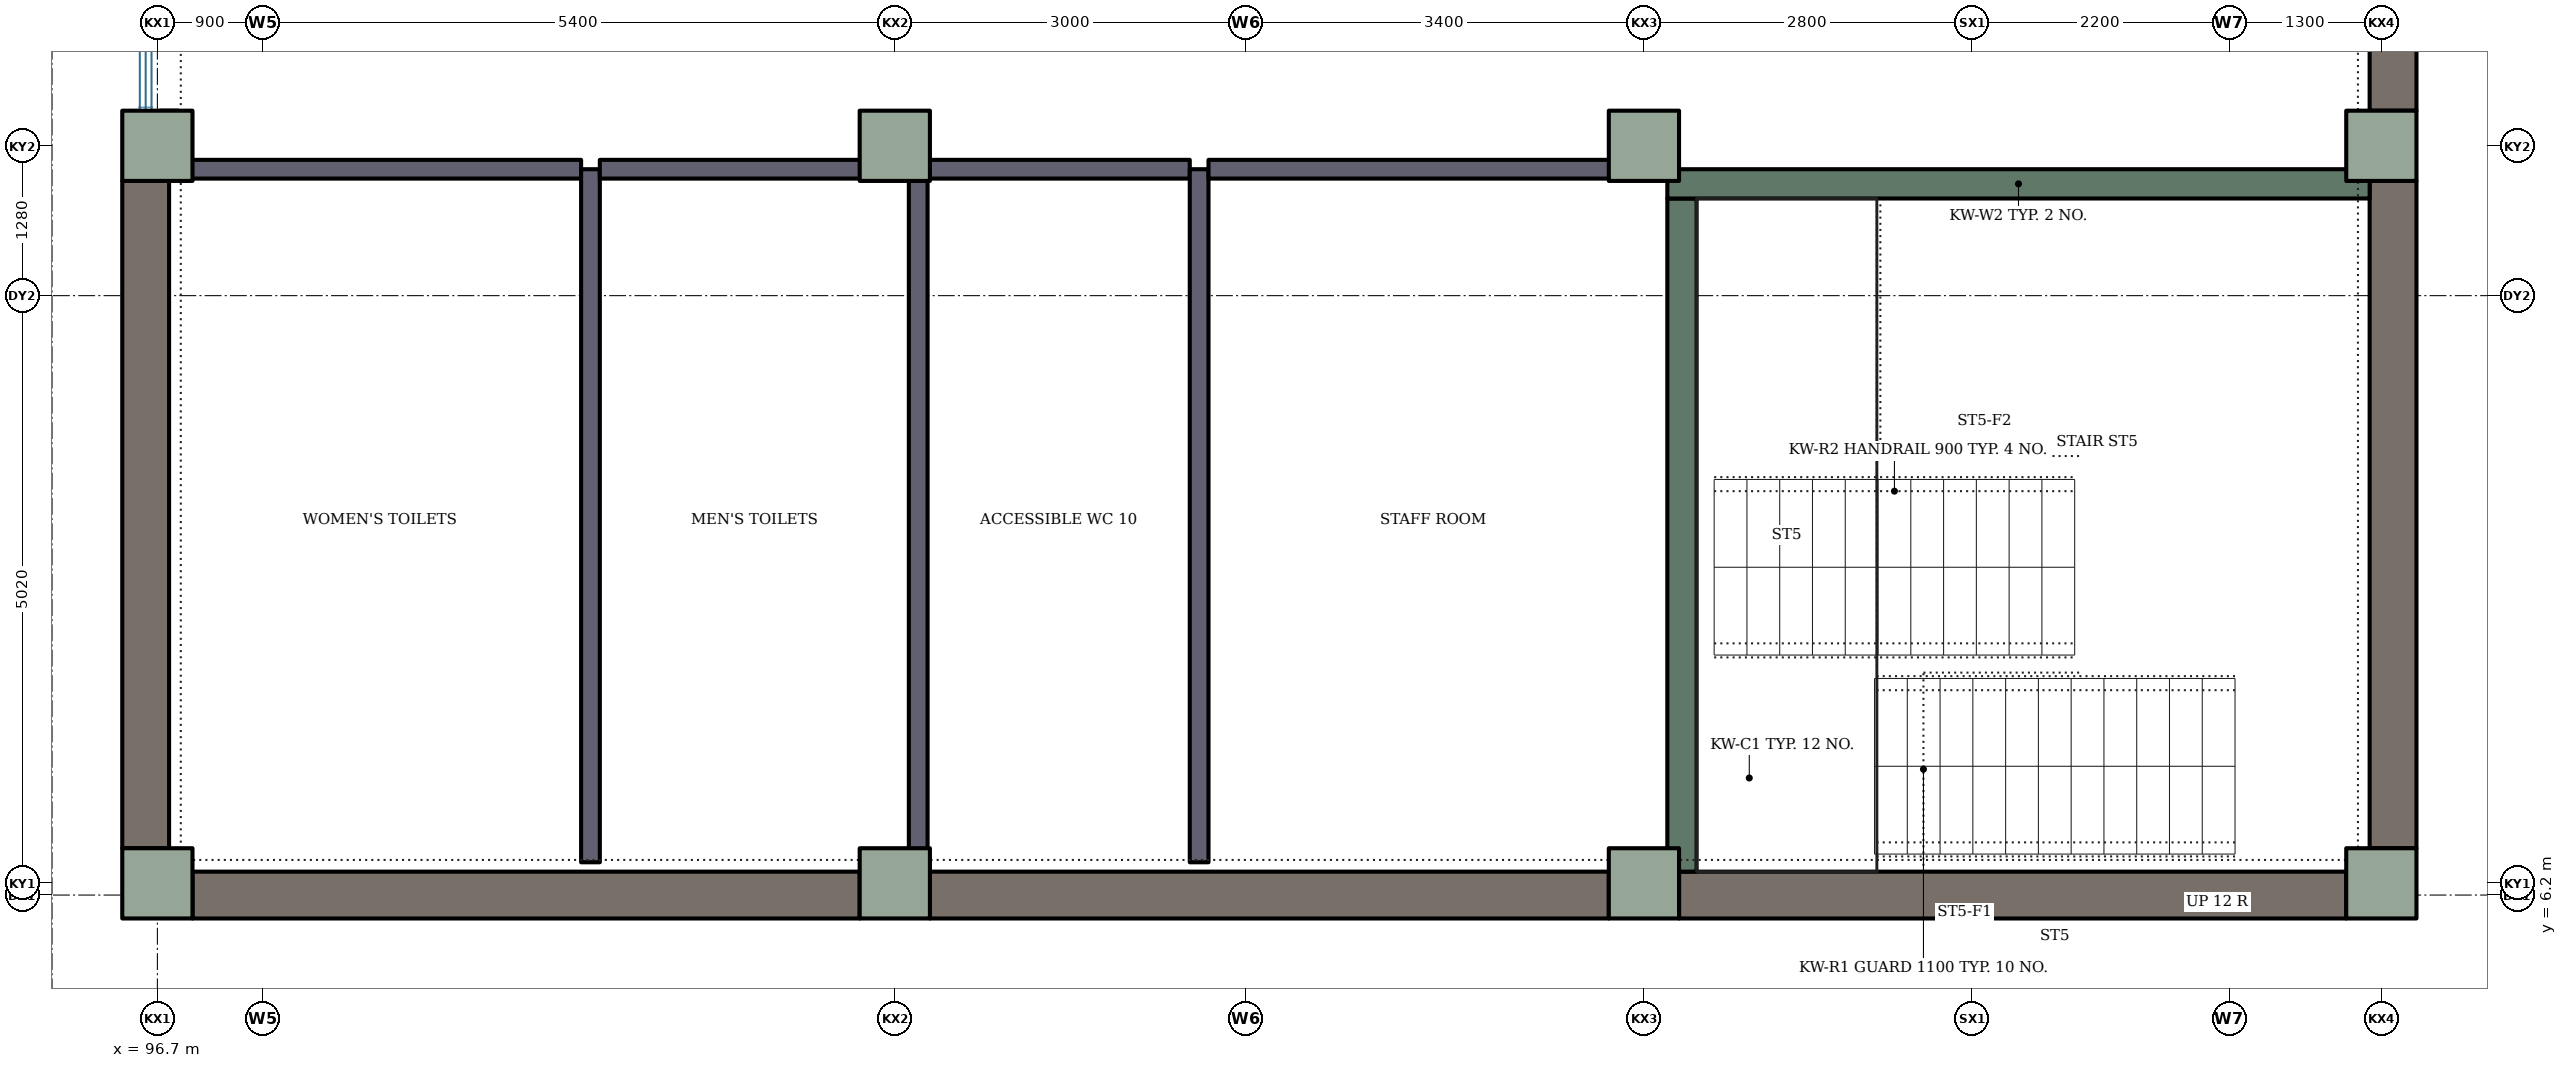
"""IFC4 building model, lengths in metres.
Left out: names, types, materials, properties, quantities, classifications, styles, units other than length and angle.
Written with IfcOpenShell. Run it as: python <this file> out.ifc"""

import sys

from ifc_helpers import new_model, si_unit, direction, frame, frame_2d, origin, origin_2d, place, context, subcontext, project, spatial, rectangle, extrude, element, fill, save


model = new_model("IFC4")
c1 = context("Model", 3, precision=1e-05, world=origin(), true_north=direction((0.0, 1.0)))
c2 = subcontext(c1, "Body", "Model", "MODEL_VIEW")
j1 = project(units=[si_unit("LENGTHUNIT", "METRE"), si_unit("PLANEANGLEUNIT", "RADIAN")], contexts=[c1])
p1 = place(None, origin())
s1 = spatial("IfcSite", under=j1, at=p1, CompositionType="ELEMENT")
p2 = place(p1, origin())
s2 = spatial("IfcBuilding", under=s1, at=p2, CompositionType="ELEMENT")
p3 = place(p2, frame((0.0, 0.0, 8.4)))
s3 = spatial("IfcBuildingStorey", under=s2, at=p3, CompositionType="ELEMENT", Elevation=8.4)
for number, where, z_axis, x_axis in (
    (1, (96.7, 6.3, 0.0), (0.0, 0.0, 1.0), (1.0, 0.0, 0.0)),
    (2, (96.7, 12.6, 0.0), (0.0, 0.0, 1.0), (1.0, 0.0, 0.0)),
    (3, (103.0, 6.3, 0.0), (0.0, 0.0, 1.0), (1.0, 0.0, 0.0)),
    (4, (103.0, 12.6, 0.0), (0.0, 0.0, 1.0), (1.0, 0.0, 0.0)),
    (5, (109.4, 6.3, 0.0), (0.0, 0.0, 1.0), (1.0, 0.0, 0.0)),
    (6, (109.4, 12.6, 0.0), (0.0, 0.0, 1.0), (1.0, 0.0, 0.0)),
    (7, (115.7, 6.3, 0.0), (0.0, 0.0, 1.0), (1.0, 0.0, 0.0)),
    (8, (115.7, 12.6, 0.0), (0.0, 0.0, 1.0), (1.0, 0.0, 0.0)),
):
    element("IfcColumn", number, at=place(p3, frame(where, z_axis=z_axis, x_axis=x_axis)), inside=s3, PredefinedType="COLUMN", context=c2, shape_type="SweptSolid", body=[
        extrude(rectangle(XDim=0.6, YDim=0.6, at=origin_2d()), origin(), (0.0, 0.0, 1.0), 4.2),
    ])
p4 = place(p3, frame((97.0, 6.2, 0.0), z_axis=(0.0, 0.0, 1.0), x_axis=(1.0, 0.0, 0.0)))
e9 = element("IfcWall", 9, at=p4, inside=s3, PredefinedType="SOLIDWALL", context=c2, shape_type="SweptSolid", body=[
    extrude(rectangle(XDim=5.7, YDim=0.4, at=frame_2d((2.85, 0.0))), origin(), (0.0, 0.0, 1.0), 4.2),
])
p5 = place(p4, frame((1.65, 0.0, 0.9)))
e10 = element("IfcOpeningElement", 10, at=p5, cuts=e9, PredefinedType="OPENING", context=c2, shape_type="SweptSolid", body=[
    extrude(rectangle(XDim=2.4, YDim=2.7, at=frame_2d((1.2, 1.35))), frame((0.0, 0.21, 0.0), z_axis=(0.0, -1.0, 0.0), x_axis=(1.0, 0.0, 0.0)), (0.0, 0.0, 1.0), 0.42),
])
p6 = place(p3, frame((103.3, 6.2, 0.0), z_axis=(0.0, 0.0, 1.0), x_axis=(1.0, 0.0, 0.0)))
e11 = element("IfcWall", 11, at=p6, inside=s3, PredefinedType="SOLIDWALL", context=c2, shape_type="SweptSolid", body=[
    extrude(rectangle(XDim=5.8, YDim=0.4, at=frame_2d((2.9, 0.0))), origin(), (0.0, 0.0, 1.0), 4.2),
])
p7 = place(p6, frame((1.7, 0.0, 0.9)))
e12 = element("IfcOpeningElement", 12, at=p7, cuts=e11, PredefinedType="OPENING", context=c2, shape_type="SweptSolid", body=[
    extrude(rectangle(XDim=2.4, YDim=2.7, at=frame_2d((1.2, 1.35))), frame((0.0, 0.21, 0.0), z_axis=(0.0, -1.0, 0.0), x_axis=(1.0, 0.0, 0.0)), (0.0, 0.0, 1.0), 0.42),
])
for number, where, z_axis, x_axis in (
    (13, (109.7, 6.2, 0.0), (0.0, 0.0, 1.0), (1.0, 0.0, 0.0)),
    (14, (96.6, 6.6, 0.0), (0.0, 0.0, 1.0), (0.0, 1.0, 0.0)),
):
    element("IfcWall", number, at=place(p3, frame(where, z_axis=z_axis, x_axis=x_axis)), inside=s3, PredefinedType="SOLIDWALL", context=c2, shape_type="SweptSolid", body=[
        extrude(rectangle(XDim=5.7, YDim=0.4, at=frame_2d((2.85, 0.0))), origin(), (0.0, 0.0, 1.0), 4.2),
    ])
p8 = place(p3, frame((115.8, 12.3, 0.0), z_axis=(0.0, 0.0, 1.0), x_axis=(0.0, -1.0, 0.0)))
e15 = element("IfcWall", 15, at=p8, inside=s3, PredefinedType="SOLIDWALL", context=c2, shape_type="SweptSolid", body=[
    extrude(rectangle(XDim=5.7, YDim=0.4, at=frame_2d((2.85, 0.0))), origin(), (0.0, 0.0, 1.0), 4.2),
])
p9 = place(p8, frame((2.35, 0.0, 0.9)))
e16 = element("IfcOpeningElement", 16, at=p9, cuts=e15, PredefinedType="OPENING", context=c2, shape_type="SweptSolid", body=[
    extrude(rectangle(XDim=1.0, YDim=1.5, at=frame_2d((0.5, 0.75))), frame((0.0, 0.21, 0.0), z_axis=(0.0, -1.0, 0.0), x_axis=(1.0, 0.0, 0.0)), (0.0, 0.0, 1.0), 0.42),
])
p10 = place(p3, frame((115.8, 18.7, 0.0), z_axis=(0.0, 0.0, 1.0), x_axis=(0.0, -1.0, 0.0)))
e17 = element("IfcWall", 17, at=p10, inside=s3, PredefinedType="SOLIDWALL", context=c2, shape_type="SweptSolid", body=[
    extrude(rectangle(XDim=5.8, YDim=0.4, at=frame_2d((2.9, 0.0))), origin(), (0.0, 0.0, 1.0), 4.2),
])
p11 = place(p10, frame((1.7, 0.0, 0.9)))
e18 = element("IfcOpeningElement", 18, at=p11, cuts=e17, PredefinedType="OPENING", context=c2, shape_type="SweptSolid", body=[
    extrude(rectangle(XDim=2.4, YDim=2.7, at=frame_2d((1.2, 1.35))), frame((0.0, 0.21, 0.0), z_axis=(0.0, -1.0, 0.0), x_axis=(1.0, 0.0, 0.0)), (0.0, 0.0, 1.0), 0.42),
])
p12 = place(p3, frame((109.725, 6.4, 0.0), z_axis=(0.0, 0.0, 1.0), x_axis=(0.0, 1.0, 0.0)))
e19 = element("IfcWall", 19, at=p12, inside=s3, PredefinedType="SHEAR", context=c2, shape_type="SweptSolid", body=[
    extrude(rectangle(XDim=5.75, YDim=0.25, at=frame_2d((2.875, 0.0))), origin(), (0.0, 0.0, 1.0), 4.2),
])
p13 = place(p3, frame((109.6, 12.275, 0.0), z_axis=(0.0, 0.0, 1.0), x_axis=(1.0, 0.0, 0.0)))
e20 = element("IfcWall", 20, at=p13, inside=s3, PredefinedType="SHEAR", context=c2, shape_type="SweptSolid", body=[
    extrude(rectangle(XDim=6.0, YDim=0.25, at=frame_2d((3.0, 0.0))), origin(), (0.0, 0.0, 1.0), 4.2),
])
p14 = place(p13, frame((4.164, 0.0, 0.0)))
e21 = element("IfcOpeningElement", 21, at=p14, cuts=e20, PredefinedType="OPENING", context=c2, shape_type="SweptSolid", body=[
    extrude(rectangle(XDim=1.0, YDim=2.1, at=frame_2d((0.5, 1.05))), frame((0.0, 0.135, 0.0), z_axis=(0.0, -1.0, 0.0), x_axis=(1.0, 0.0, 0.0)), (0.0, 0.0, 1.0), 0.27),
])
p15 = place(p3, frame((96.8, 12.9, 0.0), z_axis=(0.0, 0.0, 1.0), x_axis=(0.0, -1.0, 0.0)))
e22 = element("IfcWall", 22, at=p15, inside=s3, PredefinedType="PARTITIONING", context=c2, shape_type="SweptSolid", body=[
    extrude(rectangle(XDim=0.5, YDim=0.16, at=frame_2d((0.25, 0.0))), origin(), (0.0, 0.0, 1.0), 3.9),
])
p16 = place(p3, frame((100.32, 12.4, 0.0), z_axis=(0.0, 0.0, 1.0), x_axis=(-1.0, 0.0, 0.0)))
e23 = element("IfcWall", 23, at=p16, inside=s3, PredefinedType="PARTITIONING", context=c2, shape_type="SweptSolid", body=[
    extrude(rectangle(XDim=3.44, YDim=0.16, at=frame_2d((1.72, 0.0))), origin(), (0.0, 0.0, 1.0), 3.9),
])
p17 = place(p16, frame((1.27, 0.0, 0.0)))
e24 = element("IfcOpeningElement", 24, at=p17, cuts=e23, PredefinedType="OPENING", context=c2, shape_type="SweptSolid", body=[
    extrude(rectangle(XDim=0.9, YDim=2.1, at=frame_2d((0.45, 1.05))), frame((0.0, 0.09, 0.0), z_axis=(0.0, -1.0, 0.0), x_axis=(1.0, 0.0, 0.0)), (0.0, 0.0, 1.0), 0.18),
])
p18 = place(p3, frame((100.4, 6.48, 0.0), z_axis=(0.0, 0.0, 1.0), x_axis=(0.0, 1.0, 0.0)))
e25 = element("IfcWall", 25, at=p18, inside=s3, PredefinedType="PARTITIONING", context=c2, shape_type="SweptSolid", body=[
    extrude(rectangle(XDim=5.92, YDim=0.16, at=frame_2d((2.96, 0.0))), origin(), (0.0, 0.0, 1.0), 3.9),
])
p19 = place(p3, frame((102.78, 6.4, 0.0), z_axis=(0.0, 0.0, 1.0), x_axis=(1.0, 0.0, 0.0)))
e26 = element("IfcWall", 26, at=p19, inside=s3, PredefinedType="PARTITIONING", context=c2, shape_type="SweptSolid", body=[
    extrude(rectangle(XDim=0.42, YDim=0.16, at=frame_2d((0.21, 0.0))), origin(), (0.0, 0.0, 1.0), 3.9),
])
p20 = place(p3, frame((103.12, 12.4, 0.0), z_axis=(0.0, 0.0, 1.0), x_axis=(-1.0, 0.0, 0.0)))
e27 = element("IfcWall", 27, at=p20, inside=s3, PredefinedType="PARTITIONING", context=c2, shape_type="SweptSolid", body=[
    extrude(rectangle(XDim=2.64, YDim=0.16, at=frame_2d((1.32, 0.0))), origin(), (0.0, 0.0, 1.0), 3.9),
])
p21 = place(p20, frame((0.87, 0.0, 0.0)))
e28 = element("IfcOpeningElement", 28, at=p21, cuts=e27, PredefinedType="OPENING", context=c2, shape_type="SweptSolid", body=[
    extrude(rectangle(XDim=0.9, YDim=2.1, at=frame_2d((0.45, 1.05))), frame((0.0, 0.09, 0.0), z_axis=(0.0, -1.0, 0.0), x_axis=(1.0, 0.0, 0.0)), (0.0, 0.0, 1.0), 0.18),
])
p22 = place(p3, frame((103.2, 6.48, 0.0), z_axis=(0.0, 0.0, 1.0), x_axis=(0.0, 1.0, 0.0)))
e29 = element("IfcWall", 29, at=p22, inside=s3, PredefinedType="PARTITIONING", context=c2, shape_type="SweptSolid", body=[
    extrude(rectangle(XDim=5.92, YDim=0.16, at=frame_2d((2.96, 0.0))), origin(), (0.0, 0.0, 1.0), 3.9),
])
p23 = place(p3, frame((105.52, 12.4, 0.0), z_axis=(0.0, 0.0, 1.0), x_axis=(-1.0, 0.0, 0.0)))
e30 = element("IfcWall", 30, at=p23, inside=s3, PredefinedType="PARTITIONING", context=c2, shape_type="SweptSolid", body=[
    extrude(rectangle(XDim=2.24, YDim=0.16, at=frame_2d((1.12, 0.0))), origin(), (0.0, 0.0, 1.0), 3.9),
])
p24 = place(p23, frame((0.67, 0.0, 0.0)))
e31 = element("IfcOpeningElement", 31, at=p24, cuts=e30, PredefinedType="OPENING", context=c2, shape_type="SweptSolid", body=[
    extrude(rectangle(XDim=0.9, YDim=2.1, at=frame_2d((0.45, 1.05))), frame((0.0, 0.09, 0.0), z_axis=(0.0, -1.0, 0.0), x_axis=(1.0, 0.0, 0.0)), (0.0, 0.0, 1.0), 0.18),
])
p25 = place(p3, frame((105.6, 6.48, 0.0), z_axis=(0.0, 0.0, 1.0), x_axis=(0.0, 1.0, 0.0)))
e32 = element("IfcWall", 32, at=p25, inside=s3, PredefinedType="PARTITIONING", context=c2, shape_type="SweptSolid", body=[
    extrude(rectangle(XDim=5.92, YDim=0.16, at=frame_2d((2.96, 0.0))), origin(), (0.0, 0.0, 1.0), 3.9),
])
p26 = place(p3, frame((109.18, 6.4, 0.0), z_axis=(0.0, 0.0, 1.0), x_axis=(1.0, 0.0, 0.0)))
e33 = element("IfcWall", 33, at=p26, inside=s3, PredefinedType="PARTITIONING", context=c2, shape_type="SweptSolid", body=[
    extrude(rectangle(XDim=0.34, YDim=0.16, at=frame_2d((0.17, 0.0))), origin(), (0.0, 0.0, 1.0), 3.9),
])
p27 = place(p3, frame((109.52, 12.4, 0.0), z_axis=(0.0, 0.0, 1.0), x_axis=(-1.0, 0.0, 0.0)))
e34 = element("IfcWall", 34, at=p27, inside=s3, PredefinedType="PARTITIONING", context=c2, shape_type="SweptSolid", body=[
    extrude(rectangle(XDim=3.84, YDim=0.16, at=frame_2d((1.92, 0.0))), origin(), (0.0, 0.0, 1.0), 3.9),
])
p28 = place(p27, frame((1.47, 0.0, 0.0)))
e35 = element("IfcOpeningElement", 35, at=p28, cuts=e34, PredefinedType="OPENING", context=c2, shape_type="SweptSolid", body=[
    extrude(rectangle(XDim=1.0, YDim=2.1, at=frame_2d((0.5, 1.05))), frame((0.0, 0.09, 0.0), z_axis=(0.0, -1.0, 0.0), x_axis=(1.0, 0.0, 0.0)), (0.0, 0.0, 1.0), 0.18),
])
p29 = place(p3, frame((115.6, 12.48, 0.0), z_axis=(0.0, 0.0, 1.0), x_axis=(0.0, 1.0, 0.0)))
e36 = element("IfcWall", 36, at=p29, inside=s3, PredefinedType="PARTITIONING", context=c2, shape_type="SweptSolid", body=[
    extrude(rectangle(XDim=0.34, YDim=0.16, at=frame_2d((0.17, 0.0))), origin(), (0.0, 0.0, 1.0), 3.9),
])
p30 = place(p9, origin())
e37 = element("IfcWindow", 37, at=p30, inside=s3, PartitioningType="SINGLE_PANEL", PredefinedType="WINDOW", context=c2, shape_type="SweptSolid", body=[
    extrude(rectangle(XDim=1.0, YDim=1.5, at=frame_2d((0.5, 0.75))), frame((0.0, 0.03, 0.0), z_axis=(0.0, -1.0, 0.0), x_axis=(1.0, 0.0, 0.0)), (0.0, 0.0, 1.0), 0.06),
])
fill(e16, e37)
p31 = place(p5, origin())
e38 = element("IfcWindow", 38, at=p31, inside=s3, PartitioningType="SINGLE_PANEL", PredefinedType="WINDOW", context=c2, shape_type="SweptSolid", body=[
    extrude(rectangle(XDim=2.4, YDim=2.7, at=frame_2d((1.2, 1.35))), frame((0.0, 0.03, 0.0), z_axis=(0.0, -1.0, 0.0), x_axis=(1.0, 0.0, 0.0)), (0.0, 0.0, 1.0), 0.06),
])
fill(e10, e38)
p32 = place(p7, origin())
e39 = element("IfcWindow", 39, at=p32, inside=s3, PartitioningType="SINGLE_PANEL", PredefinedType="WINDOW", context=c2, shape_type="SweptSolid", body=[
    extrude(rectangle(XDim=2.4, YDim=2.7, at=frame_2d((1.2, 1.35))), frame((0.0, 0.03, 0.0), z_axis=(0.0, -1.0, 0.0), x_axis=(1.0, 0.0, 0.0)), (0.0, 0.0, 1.0), 0.06),
])
fill(e12, e39)
p33 = place(p17, origin())
e40 = element("IfcDoor", 40, at=p33, inside=s3, OperationType="SINGLE_SWING_LEFT", PredefinedType="DOOR", context=c2, shape_type="SweptSolid", body=[
    extrude(rectangle(XDim=0.9, YDim=2.1, at=frame_2d((0.45, 1.05))), frame((0.0, 0.025, 0.0), z_axis=(0.0, -1.0, 0.0), x_axis=(1.0, 0.0, 0.0)), (0.0, 0.0, 1.0), 0.05),
])
fill(e24, e40)
p34 = place(p21, origin())
e41 = element("IfcDoor", 41, at=p34, inside=s3, OperationType="SINGLE_SWING_LEFT", PredefinedType="DOOR", context=c2, shape_type="SweptSolid", body=[
    extrude(rectangle(XDim=0.9, YDim=2.1, at=frame_2d((0.45, 1.05))), frame((0.0, 0.025, 0.0), z_axis=(0.0, -1.0, 0.0), x_axis=(1.0, 0.0, 0.0)), (0.0, 0.0, 1.0), 0.05),
])
fill(e28, e41)
p35 = place(p24, origin())
e42 = element("IfcDoor", 42, at=p35, inside=s3, OperationType="SINGLE_SWING_LEFT", PredefinedType="DOOR", context=c2, shape_type="SweptSolid", body=[
    extrude(rectangle(XDim=0.9, YDim=2.1, at=frame_2d((0.45, 1.05))), frame((0.0, 0.025, 0.0), z_axis=(0.0, -1.0, 0.0), x_axis=(1.0, 0.0, 0.0)), (0.0, 0.0, 1.0), 0.05),
])
fill(e31, e42)
p36 = place(p28, origin())
e43 = element("IfcDoor", 43, at=p36, inside=s3, OperationType="SINGLE_SWING_LEFT", PredefinedType="DOOR", context=c2, shape_type="SweptSolid", body=[
    extrude(rectangle(XDim=1.0, YDim=2.1, at=frame_2d((0.5, 1.05))), frame((0.0, 0.025, 0.0), z_axis=(0.0, -1.0, 0.0), x_axis=(1.0, 0.0, 0.0)), (0.0, 0.0, 1.0), 0.05),
])
fill(e35, e43)
p37 = place(p14, origin())
e44 = element("IfcDoor", 44, at=p37, inside=s3, OperationType="SINGLE_SWING_LEFT", PredefinedType="DOOR", context=c2, shape_type="SweptSolid", body=[
    extrude(rectangle(XDim=1.0, YDim=2.1, at=frame_2d((0.5, 1.05))), frame((0.0, 0.025, 0.0), z_axis=(0.0, -1.0, 0.0), x_axis=(1.0, 0.0, 0.0)), (0.0, 0.0, 1.0), 0.05),
])
fill(e21, e44)
save(model, sys.argv[1])
